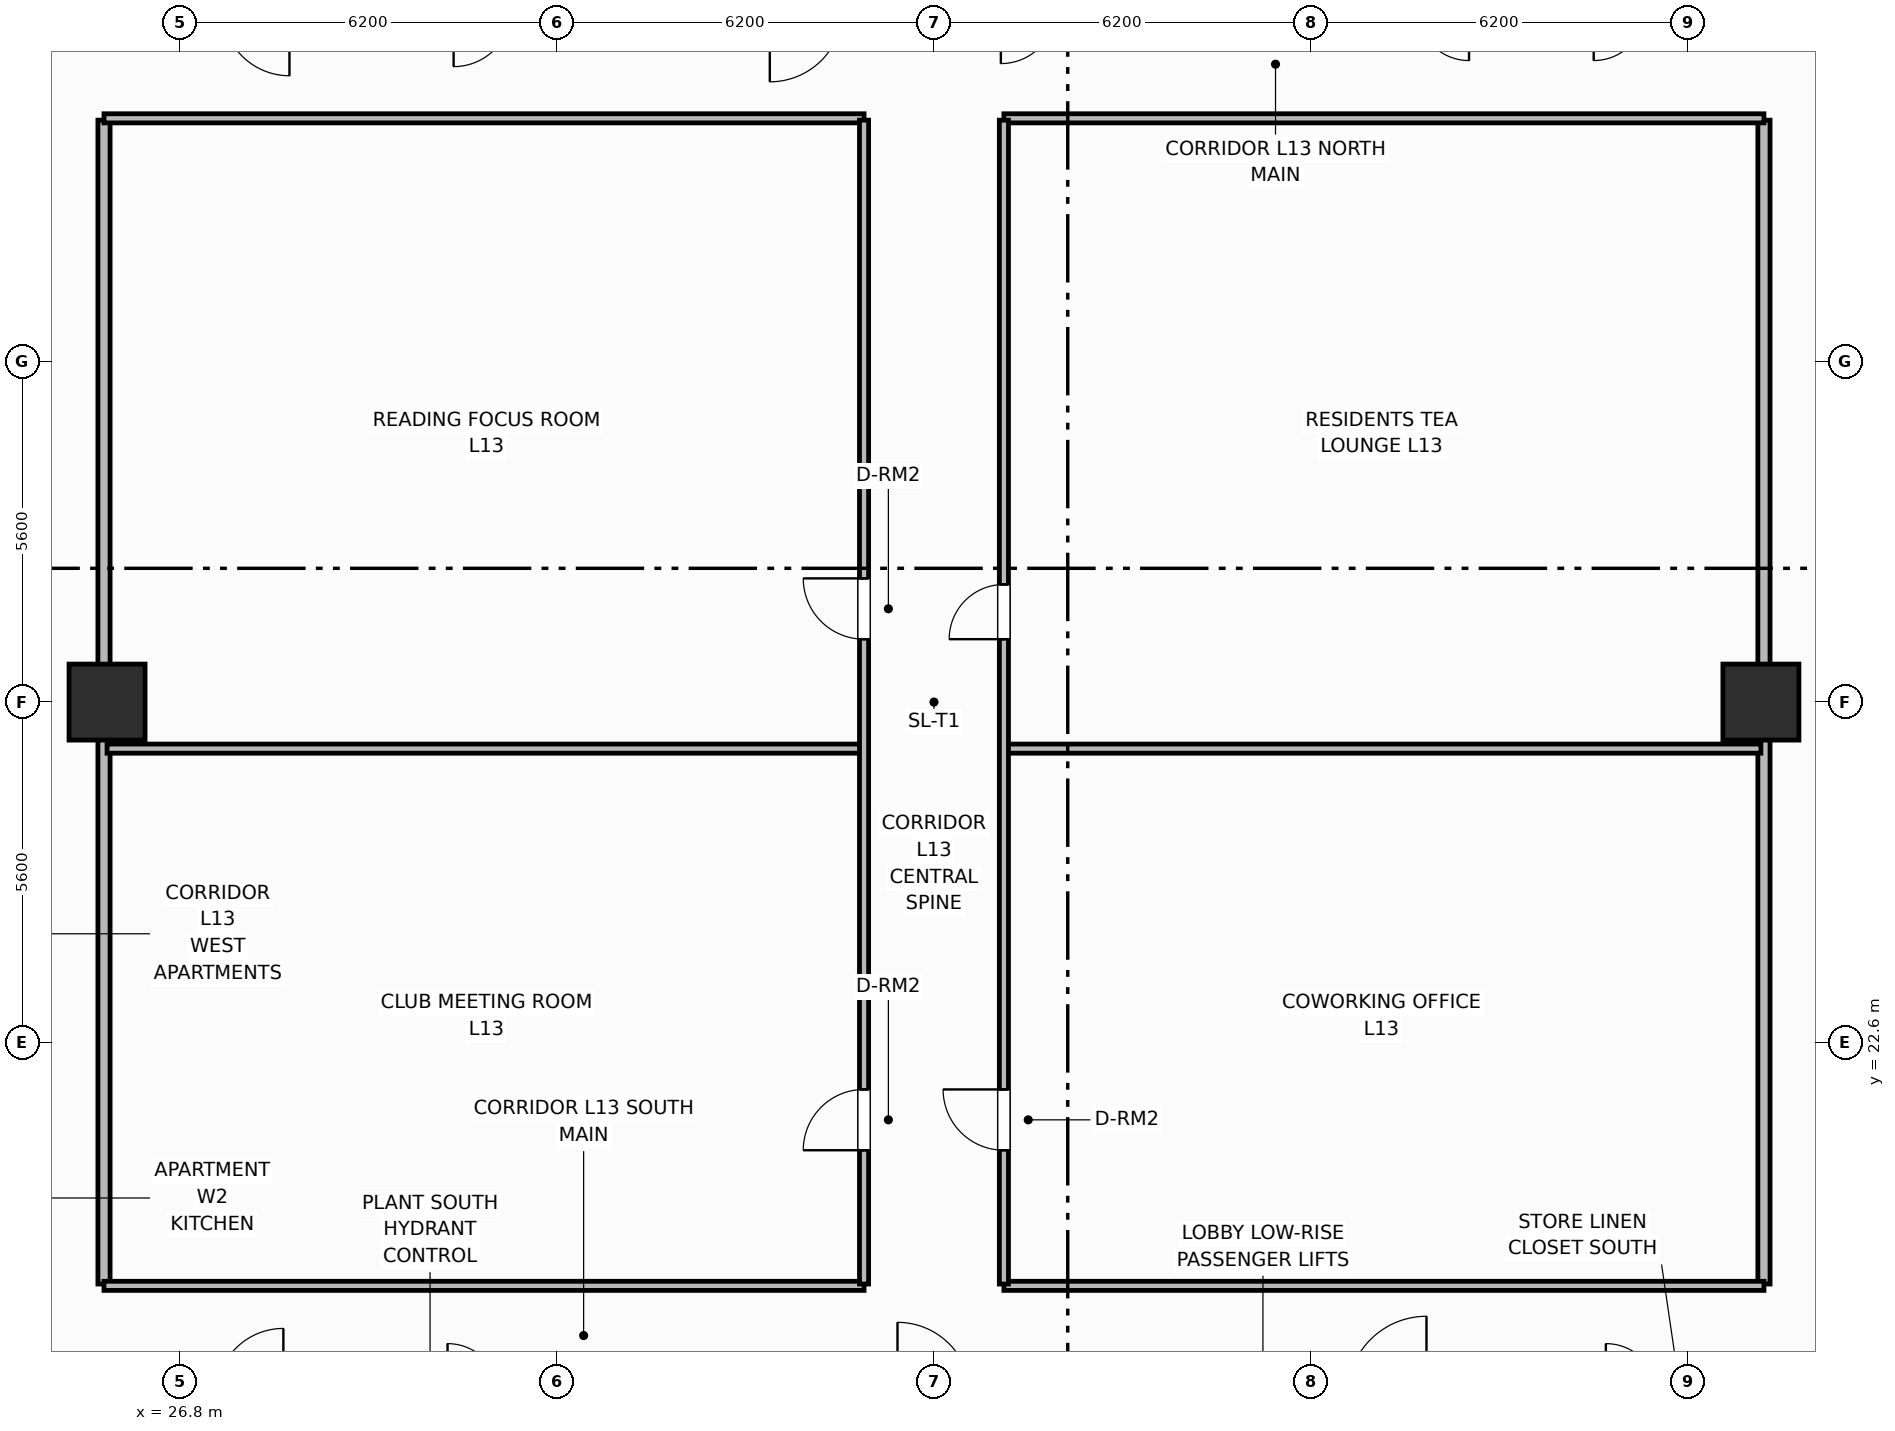
"""IFC4 building model, lengths in metres.
Left out: names, types, materials, properties, quantities, classifications, styles, units other than length and angle.
Written with IfcOpenShell. Run it as: python <this file> out.ifc"""

import sys

from ifc_helpers import new_model, si_unit, direction, frame, frame_2d, origin, origin_2d, place, context, subcontext, project, spatial, rectangle, extrude, element, fill, save


model = new_model("IFC4")
c1 = context("Model", 3, precision=1e-05, world=origin(), true_north=direction((0.0, 1.0)))
c2 = subcontext(c1, "Body", "Model", "MODEL_VIEW")
j1 = project(units=[si_unit("LENGTHUNIT", "METRE"), si_unit("PLANEANGLEUNIT", "RADIAN")], contexts=[c1])
p1 = place(None, origin())
s1 = spatial("IfcSite", under=j1, at=p1, CompositionType="ELEMENT")
p2 = place(p1, origin())
s2 = spatial("IfcBuilding", under=s1, at=p2, CompositionType="ELEMENT")
p3 = place(p2, frame((0.0, 0.0, 54.7)))
s3 = spatial("IfcBuildingStorey", under=s2, at=p3, CompositionType="ELEMENT", Elevation=54.7)
for number, where, z_axis, x_axis in (
    (1, (25.6, 28.2, 0.0), (0.0, 0.0, 1.0), (1.0, 0.0, 0.0)),
    (2, (52.8, 28.2, 0.0), (0.0, 0.0, 1.0), (1.0, 0.0, 0.0)),
):
    element("IfcColumn", number, at=place(p3, frame(where, z_axis=z_axis, x_axis=x_axis)), inside=s3, PredefinedType="COLUMN", context=c2, shape_type="SweptSolid", body=[
        extrude(rectangle(XDim=1.25, YDim=1.25, at=origin_2d()), origin(), (0.0, 0.0, 1.0), 3.7),
    ])
for number, where, z_axis, x_axis in (
    (3, (25.55, 18.63, 0.0), (0.0, 0.0, 1.0), (0.0, 1.0, 0.0)),
    (4, (52.85, 18.63, 0.0), (0.0, 0.0, 1.0), (0.0, 1.0, 0.0)),
):
    element("IfcWall", number, at=place(p3, frame(where, z_axis=z_axis, x_axis=x_axis)), inside=s3, PredefinedType="PARTITIONING", context=c2, shape_type="SweptSolid", body=[
        extrude(rectangle(XDim=19.14, YDim=0.2, at=frame_2d((9.57, 0.0))), origin(), (0.0, 0.0, 1.0), 2.53),
    ])
for number, where, z_axis, x_axis in (
    (5, (25.55, 18.6, 0.0), (0.0, 0.0, 1.0), (1.0, 0.0, 0.0)),
    (6, (40.35, 18.6, 0.0), (0.0, 0.0, 1.0), (1.0, 0.0, 0.0)),
    (7, (25.55, 37.8, 0.0), (0.0, 0.0, 1.0), (1.0, 0.0, 0.0)),
    (8, (40.35, 37.8, 0.0), (0.0, 0.0, 1.0), (1.0, 0.0, 0.0)),
):
    element("IfcWall", number, at=place(p3, frame(where, z_axis=z_axis, x_axis=x_axis)), inside=s3, PredefinedType="PARTITIONING", context=c2, shape_type="SweptSolid", body=[
        extrude(rectangle(XDim=12.5, YDim=0.15, at=frame_2d((6.25, 0.0))), origin(), (0.0, 0.0, 1.0), 2.53),
    ])
p4 = place(p3, frame((25.6, 27.434, 0.0), z_axis=(0.0, 0.0, 1.0), x_axis=(1.0, 0.0, 0.0)))
e9 = element("IfcWall", 9, at=p4, inside=s3, PredefinedType="PARTITIONING", context=c2, shape_type="SweptSolid", body=[
    extrude(rectangle(XDim=12.47, YDim=0.15, at=frame_2d((6.235, 0.0))), origin(), (0.0, 0.0, 1.0), 2.53),
])
p5 = place(p3, frame((40.38, 27.434, 0.0), z_axis=(0.0, 0.0, 1.0), x_axis=(1.0, 0.0, 0.0)))
e10 = element("IfcWall", 10, at=p5, inside=s3, PredefinedType="PARTITIONING", context=c2, shape_type="SweptSolid", body=[
    extrude(rectangle(XDim=12.42, YDim=0.15, at=frame_2d((6.21, 0.0))), origin(), (0.0, 0.0, 1.0), 2.53),
])
p6 = place(p3, frame((38.05, 18.63, 0.0), z_axis=(0.0, 0.0, 1.0), x_axis=(0.0, 1.0, 0.0)))
e11 = element("IfcWall", 11, at=p6, inside=s3, PredefinedType="PARTITIONING", context=c2, shape_type="SweptSolid", body=[
    extrude(rectangle(XDim=19.14, YDim=0.15, at=frame_2d((9.57, 0.0))), origin(), (0.0, 0.0, 1.0), 2.53),
])
p7 = place(p6, frame((2.2, 0.0, 0.0)))
e12 = element("IfcOpeningElement", 12, at=p7, cuts=e11, PredefinedType="OPENING", context=c2, shape_type="SweptSolid", body=[
    extrude(rectangle(XDim=1.0, YDim=2.15, at=frame_2d((0.5, 1.075))), frame((0.0, 0.085, 0.0), z_axis=(0.0, -1.0, 0.0), x_axis=(1.0, 0.0, 0.0)), (0.0, 0.0, 1.0), 0.17),
])
p8 = place(p6, frame((10.604, 0.0, 0.0)))
e13 = element("IfcOpeningElement", 13, at=p8, cuts=e11, PredefinedType="OPENING", context=c2, shape_type="SweptSolid", body=[
    extrude(rectangle(XDim=1.0, YDim=2.15, at=frame_2d((0.5, 1.075))), frame((0.0, 0.085, 0.0), z_axis=(0.0, -1.0, 0.0), x_axis=(1.0, 0.0, 0.0)), (0.0, 0.0, 1.0), 0.17),
])
p9 = place(p3, frame((40.35, 18.63, 0.0), z_axis=(0.0, 0.0, 1.0), x_axis=(0.0, 1.0, 0.0)))
e14 = element("IfcWall", 14, at=p9, inside=s3, PredefinedType="PARTITIONING", context=c2, shape_type="SweptSolid", body=[
    extrude(rectangle(XDim=19.14, YDim=0.15, at=frame_2d((9.57, 0.0))), origin(), (0.0, 0.0, 1.0), 2.53),
])
p10 = place(p9, frame((2.2, 0.0, 0.0)))
e15 = element("IfcOpeningElement", 15, at=p10, cuts=e14, PredefinedType="OPENING", context=c2, shape_type="SweptSolid", body=[
    extrude(rectangle(XDim=1.0, YDim=2.15, at=frame_2d((0.5, 1.075))), frame((0.0, 0.085, 0.0), z_axis=(0.0, -1.0, 0.0), x_axis=(1.0, 0.0, 0.0)), (0.0, 0.0, 1.0), 0.17),
])
p11 = place(p9, frame((10.604, 0.0, 0.0)))
e16 = element("IfcOpeningElement", 16, at=p11, cuts=e14, PredefinedType="OPENING", context=c2, shape_type="SweptSolid", body=[
    extrude(rectangle(XDim=0.9, YDim=2.1, at=frame_2d((0.45, 1.05))), frame((0.0, 0.085, 0.0), z_axis=(0.0, -1.0, 0.0), x_axis=(1.0, 0.0, 0.0)), (0.0, 0.0, 1.0), 0.17),
])
p12 = place(p7, origin())
e17 = element("IfcDoor", 17, at=p12, inside=s3, OperationType="SINGLE_SWING_LEFT", PredefinedType="DOOR", context=c2, shape_type="SweptSolid", body=[
    extrude(rectangle(XDim=1.0, YDim=2.15, at=frame_2d((0.5, 1.075))), frame((0.0, 0.025, 0.0), z_axis=(0.0, -1.0, 0.0), x_axis=(1.0, 0.0, 0.0)), (0.0, 0.0, 1.0), 0.05),
])
fill(e12, e17)
p13 = place(p8, origin())
e18 = element("IfcDoor", 18, at=p13, inside=s3, OperationType="SINGLE_SWING_RIGHT", PredefinedType="DOOR", context=c2, shape_type="SweptSolid", body=[
    extrude(rectangle(XDim=1.0, YDim=2.15, at=frame_2d((0.5, 1.075))), frame((0.0, 0.025, 0.0), z_axis=(0.0, -1.0, 0.0), x_axis=(1.0, 0.0, 0.0)), (0.0, 0.0, 1.0), 0.05),
])
fill(e13, e18)
p14 = place(p10, origin())
e19 = element("IfcDoor", 19, at=p14, inside=s3, OperationType="SINGLE_SWING_RIGHT", PredefinedType="DOOR", context=c2, shape_type="SweptSolid", body=[
    extrude(rectangle(XDim=1.0, YDim=2.15, at=frame_2d((0.5, 1.075))), frame((0.0, 0.025, 0.0), z_axis=(0.0, -1.0, 0.0), x_axis=(1.0, 0.0, 0.0)), (0.0, 0.0, 1.0), 0.05),
])
fill(e15, e19)
p15 = place(p11, origin())
e20 = element("IfcDoor", 20, at=p15, inside=s3, OperationType="SINGLE_SWING_LEFT", PredefinedType="DOOR", context=c2, shape_type="SweptSolid", body=[
    extrude(rectangle(XDim=0.9, YDim=2.1, at=frame_2d((0.45, 1.05))), frame((0.0, 0.025, 0.0), z_axis=(0.0, -1.0, 0.0), x_axis=(1.0, 0.0, 0.0)), (0.0, 0.0, 1.0), 0.05),
])
fill(e16, e20)
save(model, sys.argv[1])
